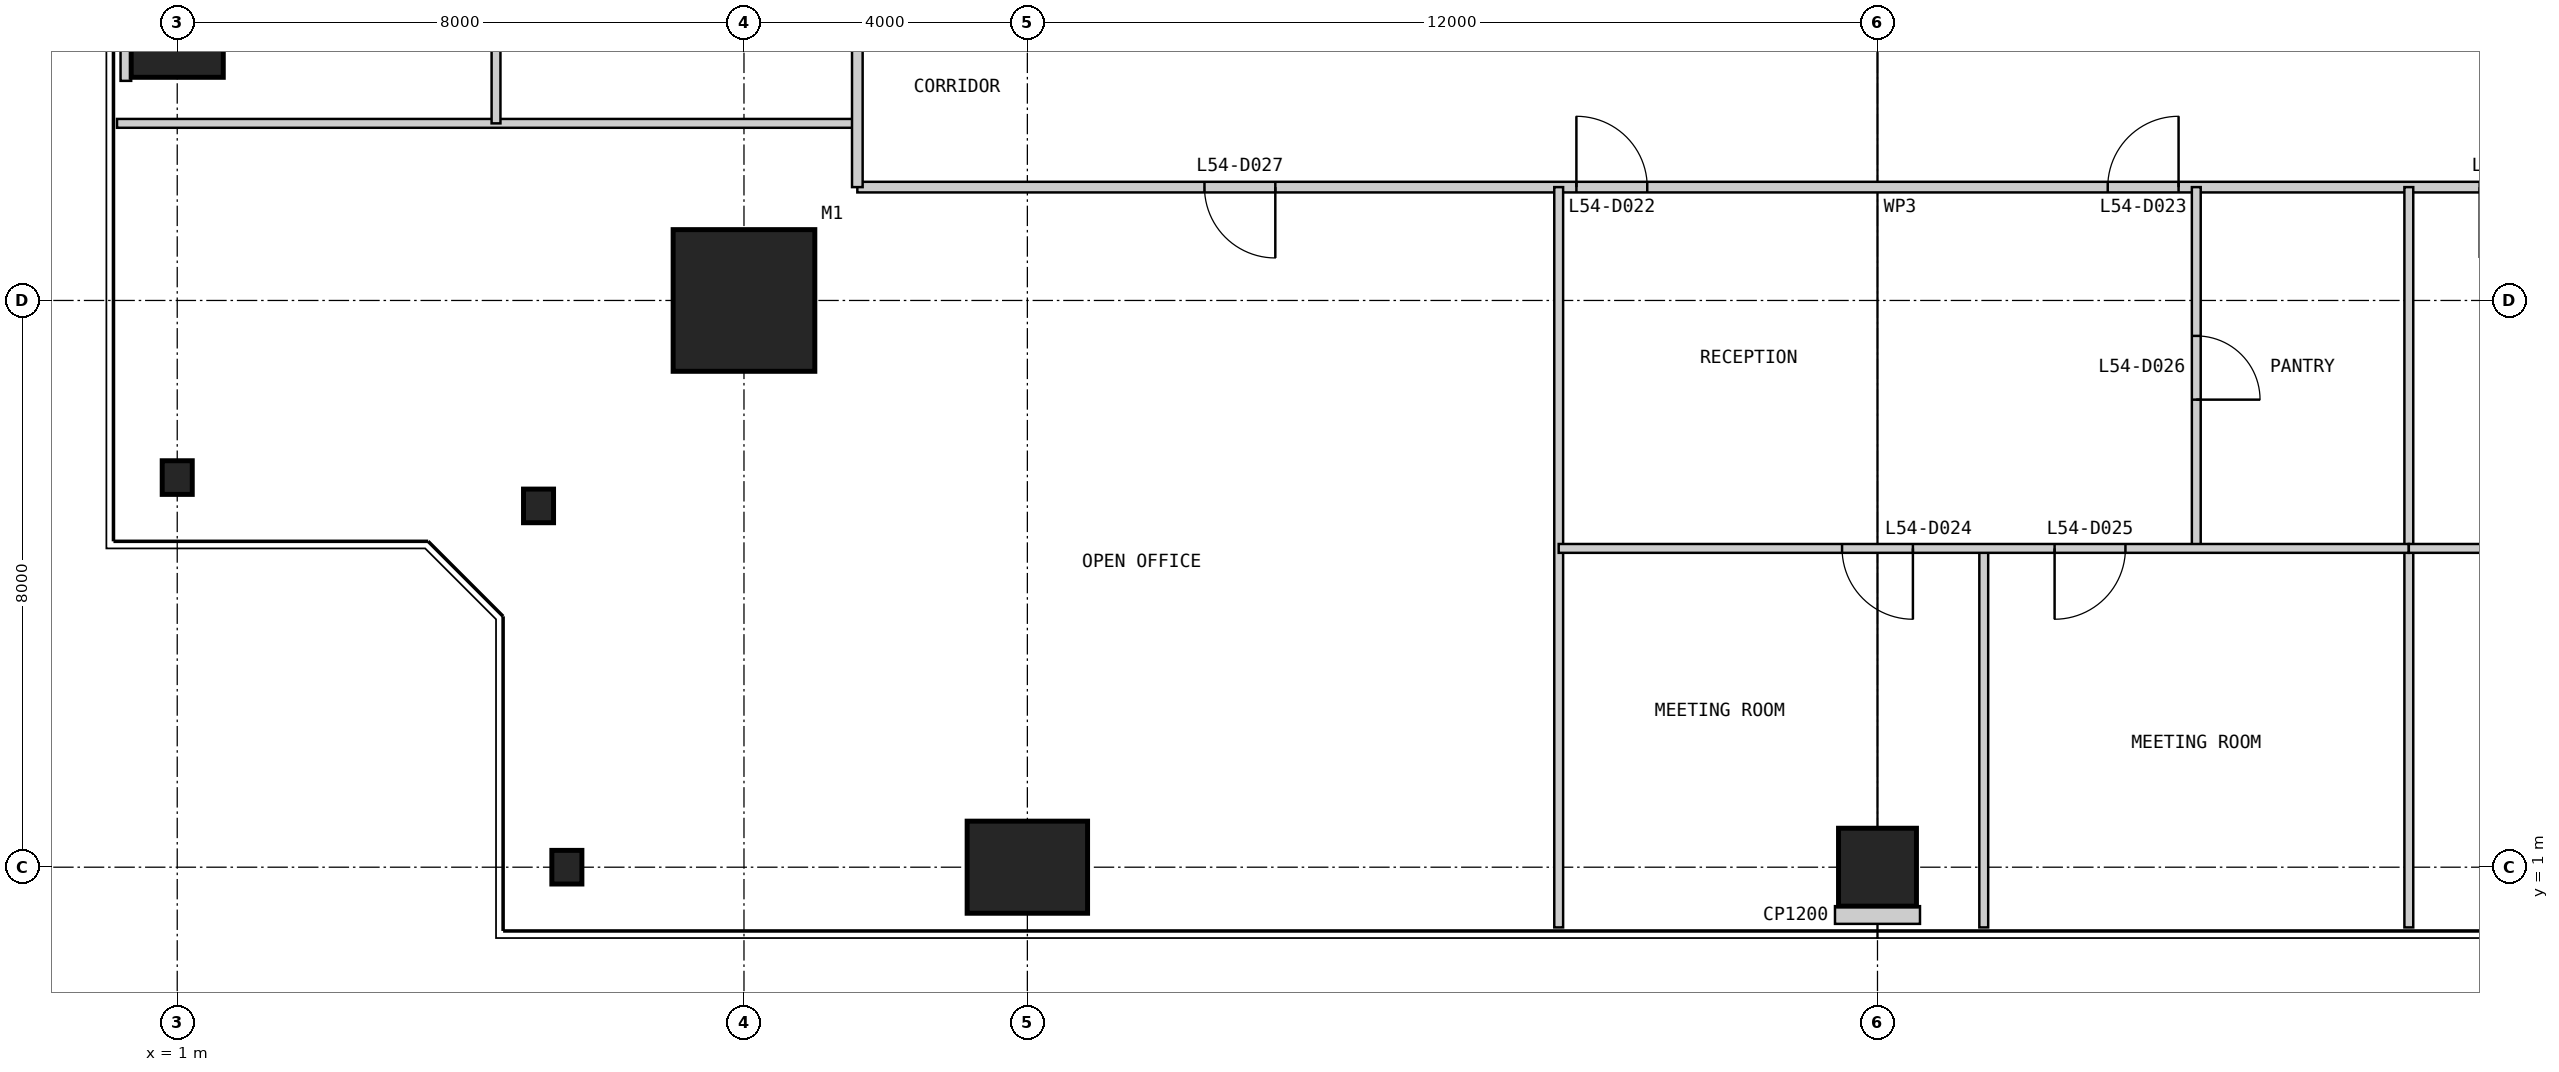
"""IFC4 building model, lengths in metres.
Left out: names, types, materials, properties, quantities, classifications, styles, units other than length and angle.
Written with IfcOpenShell. Run it as: python <this file> out.ifc"""

import sys

from ifc_helpers import new_model, si_unit, direction, frame, frame_2d, origin, origin_2d, place, context, subcontext, project, spatial, rectangle, i_section, extrude, element, fill, save


model = new_model("IFC4")
c1 = context("Model", 3, precision=1e-05, world=origin(), true_north=direction((0.0, 1.0)))
c2 = subcontext(c1, "Body", "Model", "MODEL_VIEW")
j1 = project(units=[si_unit("LENGTHUNIT", "METRE"), si_unit("PLANEANGLEUNIT", "RADIAN")], contexts=[c1])
p1 = place(None, origin())
s1 = spatial("IfcSite", under=j1, at=p1, CompositionType="ELEMENT")
p2 = place(p1, origin())
s2 = spatial("IfcBuilding", under=s1, at=p2, CompositionType="ELEMENT")
p3 = place(p2, frame((0.0, 0.0, 229.8)))
s3 = spatial("IfcBuildingStorey", under=s2, at=p3, CompositionType="ELEMENT", Elevation=229.8)
p4 = place(p3, frame((9.0, 9.0, 0.0), z_axis=(0.0, 0.0, 1.0), x_axis=(1.0, 0.0, 0.0)))
e1 = element("IfcColumn", 1, at=p4, inside=s3, PredefinedType="COLUMN", context=c2, shape_type="SweptSolid", body=[
    extrude(rectangle(XDim=2.0, YDim=2.0, at=origin_2d()), origin(), (0.0, 0.0, 1.0), 4.0),
])
p5 = place(p3, frame((6.5, 1.0, 0.0), z_axis=(0.0, 0.0, 1.0), x_axis=(1.0, 0.0, 0.0)))
e2 = element("IfcColumn", 2, at=p5, inside=s3, PredefinedType="COLUMN", context=c2, shape_type="SweptSolid", body=[
    extrude(i_section(OverallWidth=0.424, OverallDepth=0.475, WebThickness=0.048, FlangeThickness=0.077, at=origin_2d()), origin(), (0.0, 0.0, 1.0), 4.0),
])
p6 = place(p3, frame((13.0, 1.0, 0.0), z_axis=(0.0, 0.0, 1.0), x_axis=(1.0, 0.0, 0.0)))
e3 = element("IfcColumn", 3, at=p6, inside=s3, PredefinedType="COLUMN", context=c2, shape_type="SweptSolid", body=[
    extrude(rectangle(XDim=1.7, YDim=1.3, at=origin_2d()), origin(), (0.0, 0.0, 1.0), 4.0),
])
p7 = place(p3, frame((25.0, 1.0, 0.0), z_axis=(0.0, 0.0, 1.0), x_axis=(1.0, 0.0, 0.0)))
e4 = element("IfcColumn", 4, at=p7, inside=s3, PredefinedType="COLUMN", context=c2, shape_type="SweptSolid", body=[
    extrude(rectangle(XDim=1.1, YDim=1.1, at=origin_2d()), origin(), (0.0, 0.0, 1.0), 4.0),
])
p8 = place(p3, frame((1.0, 13.0, 0.0), z_axis=(0.0, 0.0, 1.0), x_axis=(1.0, 0.0, 0.0)))
e5 = element("IfcColumn", 5, at=p8, inside=s3, PredefinedType="COLUMN", context=c2, shape_type="SweptSolid", body=[
    extrude(rectangle(XDim=1.3, YDim=1.7, at=origin_2d()), origin(), (0.0, 0.0, 1.0), 4.0),
])
for number, where, z_axis, x_axis in (
    (6, (1.0, 6.5, 0.0), (0.0, 0.0, 1.0), (1.0, 0.0, 0.0)),
    (7, (6.1, 6.1, 0.0), (0.0, 0.0, 1.0), (1.0, 0.0, 0.0)),
):
    element("IfcColumn", number, at=place(p3, frame(where, z_axis=z_axis, x_axis=x_axis)), inside=s3, PredefinedType="COLUMN", context=c2, shape_type="SweptSolid", body=[
        extrude(i_section(OverallWidth=0.424, OverallDepth=0.475, WebThickness=0.048, FlangeThickness=0.077, at=origin_2d()), origin(), (0.0, 0.0, 1.0), 4.0),
    ])
p9 = place(p3, frame((10.6, 10.6, 0.0), z_axis=(0.0, 0.0, 1.0), x_axis=(1.0, 0.0, 0.0)))
e8 = element("IfcWall", 8, at=p9, inside=s3, PredefinedType="PARTITIONING", context=c2, shape_type="SweptSolid", body=[
    extrude(rectangle(XDim=28.8, YDim=0.15, at=frame_2d((14.4, 0.0))), origin(), (0.0, 0.0, 1.0), 3.8),
])
p10 = place(p9, frame((10.15, 0.0, 0.0)))
e9 = element("IfcOpeningElement", 9, at=p10, cuts=e8, PredefinedType="OPENING", context=c2, shape_type="SweptSolid", body=[
    extrude(rectangle(XDim=1.0, YDim=2.2, at=frame_2d((0.5, 1.1))), frame((0.0, 0.085, 0.0), z_axis=(0.0, -1.0, 0.0), x_axis=(1.0, 0.0, 0.0)), (0.0, 0.0, 1.0), 0.17),
])
p11 = place(p9, frame((17.65, 0.0, 0.0)))
e10 = element("IfcOpeningElement", 10, at=p11, cuts=e8, PredefinedType="OPENING", context=c2, shape_type="SweptSolid", body=[
    extrude(rectangle(XDim=1.0, YDim=2.2, at=frame_2d((0.5, 1.1))), frame((0.0, 0.085, 0.0), z_axis=(0.0, -1.0, 0.0), x_axis=(1.0, 0.0, 0.0)), (0.0, 0.0, 1.0), 0.17),
])
p12 = place(p9, frame((4.9, 0.0, 0.0)))
e11 = element("IfcOpeningElement", 11, at=p12, cuts=e8, PredefinedType="OPENING", context=c2, shape_type="SweptSolid", body=[
    extrude(rectangle(XDim=1.0, YDim=2.2, at=frame_2d((0.5, 1.1))), frame((0.0, 0.085, 0.0), z_axis=(0.0, -1.0, 0.0), x_axis=(1.0, 0.0, 0.0)), (0.0, 0.0, 1.0), 0.17),
])
p13 = place(p9, frame((22.9, 0.0, 0.0)))
e12 = element("IfcOpeningElement", 12, at=p13, cuts=e8, PredefinedType="OPENING", context=c2, shape_type="SweptSolid", body=[
    extrude(rectangle(XDim=1.0, YDim=2.2, at=frame_2d((0.5, 1.1))), frame((0.0, 0.085, 0.0), z_axis=(0.0, -1.0, 0.0), x_axis=(1.0, 0.0, 0.0)), (0.0, 0.0, 1.0), 0.17),
])
p14 = place(p9, frame((25.9, 0.0, 0.0)))
e13 = element("IfcOpeningElement", 13, at=p14, cuts=e8, PredefinedType="OPENING", context=c2, shape_type="SweptSolid", body=[
    extrude(rectangle(XDim=1.0, YDim=2.2, at=frame_2d((0.5, 1.1))), frame((0.0, 0.085, 0.0), z_axis=(0.0, -1.0, 0.0), x_axis=(1.0, 0.0, 0.0)), (0.0, 0.0, 1.0), 0.17),
])
for number, where, z_axis, x_axis in (
    (14, (0.15, 11.5, 0.0), (0.0, 0.0, 1.0), (1.0, 0.0, 0.0)),
    (15, (20.5, 0.15, 0.0), (0.0, 0.0, 1.0), (0.0, 1.0, 0.0)),
):
    element("IfcWall", number, at=place(p3, frame(where, z_axis=z_axis, x_axis=x_axis)), inside=s3, PredefinedType="PARTITIONING", context=c2, shape_type="SweptSolid", body=[
        extrude(rectangle(XDim=10.45, YDim=0.125, at=frame_2d((5.225, 0.0))), origin(), (0.0, 0.0, 1.0), 3.8),
    ])
p15 = place(p3, frame((26.5, 0.15, 0.0), z_axis=(0.0, 0.0, 1.0), x_axis=(0.0, 1.0, 0.0)))
e16 = element("IfcWall", 16, at=p15, inside=s3, PredefinedType="PARTITIONING", context=c2, shape_type="SweptSolid", body=[
    extrude(rectangle(XDim=5.35, YDim=0.125, at=frame_2d((2.675, 0.0))), origin(), (0.0, 0.0, 1.0), 3.8),
])
p16 = place(p3, frame((29.5, 5.5, 0.0), z_axis=(0.0, 0.0, 1.0), x_axis=(0.0, 1.0, 0.0)))
e17 = element("IfcWall", 17, at=p16, inside=s3, PredefinedType="PARTITIONING", context=c2, shape_type="SweptSolid", body=[
    extrude(rectangle(XDim=5.1, YDim=0.125, at=frame_2d((2.55, 0.0))), origin(), (0.0, 0.0, 1.0), 3.8),
])
p17 = place(p16, frame((2.1, 0.0, 0.0)))
e18 = element("IfcOpeningElement", 18, at=p17, cuts=e17, PredefinedType="OPENING", context=c2, shape_type="SweptSolid", body=[
    extrude(rectangle(XDim=0.9, YDim=2.2, at=frame_2d((0.45, 1.1))), frame((0.0, 0.073, 0.0), z_axis=(0.0, -1.0, 0.0), x_axis=(1.0, 0.0, 0.0)), (0.0, 0.0, 1.0), 0.145),
])
p18 = place(p3, frame((32.5, 0.15, 0.0), z_axis=(0.0, 0.0, 1.0), x_axis=(0.0, 1.0, 0.0)))
e19 = element("IfcWall", 19, at=p18, inside=s3, PredefinedType="PARTITIONING", context=c2, shape_type="SweptSolid", body=[
    extrude(rectangle(XDim=10.45, YDim=0.125, at=frame_2d((5.225, 0.0))), origin(), (0.0, 0.0, 1.0), 3.8),
])
p19 = place(p3, frame((20.5, 5.5, 0.0), z_axis=(0.0, 0.0, 1.0), x_axis=(1.0, 0.0, 0.0)))
e20 = element("IfcWall", 20, at=p19, inside=s3, PredefinedType="PARTITIONING", context=c2, shape_type="SweptSolid", body=[
    extrude(rectangle(XDim=12.0, YDim=0.125, at=frame_2d((6.0, 0.0))), origin(), (0.0, 0.0, 1.0), 3.8),
])
p20 = place(p19, frame((4.0, 0.0, 0.0)))
e21 = element("IfcOpeningElement", 21, at=p20, cuts=e20, PredefinedType="OPENING", context=c2, shape_type="SweptSolid", body=[
    extrude(rectangle(XDim=1.0, YDim=2.2, at=frame_2d((0.5, 1.1))), frame((0.0, 0.073, 0.0), z_axis=(0.0, -1.0, 0.0), x_axis=(1.0, 0.0, 0.0)), (0.0, 0.0, 1.0), 0.145),
])
p21 = place(p19, frame((7.0, 0.0, 0.0)))
e22 = element("IfcOpeningElement", 22, at=p21, cuts=e20, PredefinedType="OPENING", context=c2, shape_type="SweptSolid", body=[
    extrude(rectangle(XDim=1.0, YDim=2.2, at=frame_2d((0.5, 1.1))), frame((0.0, 0.073, 0.0), z_axis=(0.0, -1.0, 0.0), x_axis=(1.0, 0.0, 0.0)), (0.0, 0.0, 1.0), 0.145),
])
p22 = place(p3, frame((32.5, 5.5, 0.0), z_axis=(0.0, 0.0, 1.0), x_axis=(1.0, 0.0, 0.0)))
e23 = element("IfcWall", 23, at=p22, inside=s3, PredefinedType="PARTITIONING", context=c2, shape_type="SweptSolid", body=[
    extrude(rectangle(XDim=3.0, YDim=0.125, at=frame_2d((1.5, 0.0))), origin(), (0.0, 0.0, 1.0), 3.8),
])
p23 = place(p3, frame((10.6, 39.4, 0.0), z_axis=(0.0, 0.0, 1.0), x_axis=(0.0, -1.0, 0.0)))
e24 = element("IfcWall", 24, at=p23, inside=s3, PredefinedType="PARTITIONING", context=c2, shape_type="SweptSolid", body=[
    extrude(rectangle(XDim=28.8, YDim=0.15, at=frame_2d((14.4, 0.0))), origin(), (0.0, 0.0, 1.0), 3.8),
])
p24 = place(p23, frame((1.15, 0.0, 0.0)))
e25 = element("IfcOpeningElement", 25, at=p24, cuts=e24, PredefinedType="OPENING", context=c2, shape_type="SweptSolid", body=[
    extrude(rectangle(XDim=1.0, YDim=2.2, at=frame_2d((0.5, 1.1))), frame((0.0, 0.085, 0.0), z_axis=(0.0, -1.0, 0.0), x_axis=(1.0, 0.0, 0.0)), (0.0, 0.0, 1.0), 0.17),
])
p25 = place(p23, frame((23.65, 0.0, 0.0)))
e26 = element("IfcOpeningElement", 26, at=p25, cuts=e24, PredefinedType="OPENING", context=c2, shape_type="SweptSolid", body=[
    extrude(rectangle(XDim=1.0, YDim=2.2, at=frame_2d((0.5, 1.1))), frame((0.0, 0.085, 0.0), z_axis=(0.0, -1.0, 0.0), x_axis=(1.0, 0.0, 0.0)), (0.0, 0.0, 1.0), 0.17),
])
p26 = place(p3, frame((5.5, 35.5, 0.0), z_axis=(0.0, 0.0, 1.0), x_axis=(0.0, -1.0, 0.0)))
e27 = element("IfcWall", 27, at=p26, inside=s3, PredefinedType="PARTITIONING", context=c2, shape_type="SweptSolid", body=[
    extrude(rectangle(XDim=24.0, YDim=0.125, at=frame_2d((12.0, 0.0))), origin(), (0.0, 0.0, 1.0), 3.8),
])
p27 = place(p26, frame((16.05, 0.0, 0.0)))
e28 = element("IfcOpeningElement", 28, at=p27, cuts=e27, PredefinedType="OPENING", context=c2, shape_type="SweptSolid", body=[
    extrude(rectangle(XDim=0.9, YDim=2.2, at=frame_2d((0.45, 1.1))), frame((0.0, 0.073, 0.0), z_axis=(0.0, -1.0, 0.0), x_axis=(1.0, 0.0, 0.0)), (0.0, 0.0, 1.0), 0.145),
])
p28 = place(p26, frame((19.05, 0.0, 0.0)))
e29 = element("IfcOpeningElement", 29, at=p28, cuts=e27, PredefinedType="OPENING", context=c2, shape_type="SweptSolid", body=[
    extrude(rectangle(XDim=0.9, YDim=2.2, at=frame_2d((0.45, 1.1))), frame((0.0, 0.073, 0.0), z_axis=(0.0, -1.0, 0.0), x_axis=(1.0, 0.0, 0.0)), (0.0, 0.0, 1.0), 0.145),
])
p29 = place(p3, frame((25.0, 0.2, 0.0), z_axis=(0.0, 0.0, 1.0), x_axis=(0.0, 1.0, 0.0)))
e30 = element("IfcWall", 30, at=p29, inside=s3, PredefinedType="PARTITIONING", context=c2, shape_type="SweptSolid", body=[
    extrude(rectangle(XDim=0.25, YDim=1.2, at=frame_2d((0.125, 0.0))), origin(), (0.0, 0.0, 1.0), 3.8),
])
p30 = place(p3, frame((0.2, 13.0, 0.0), z_axis=(0.0, 0.0, 1.0), x_axis=(1.0, 0.0, 0.0)))
e31 = element("IfcWall", 31, at=p30, inside=s3, PredefinedType="PARTITIONING", context=c2, shape_type="SweptSolid", body=[
    extrude(rectangle(XDim=0.15, YDim=1.8, at=frame_2d((0.075, 0.0))), origin(), (0.0, 0.0, 1.0), 3.8),
])
p31 = place(p10, origin())
e32 = element("IfcDoor", 32, at=p31, inside=s3, OperationType="SINGLE_SWING_LEFT", PredefinedType="DOOR", context=c2, shape_type="SweptSolid", body=[
    extrude(rectangle(XDim=1.0, YDim=2.2, at=frame_2d((0.5, 1.1))), frame((0.0, 0.025, 0.0), z_axis=(0.0, -1.0, 0.0), x_axis=(1.0, 0.0, 0.0)), (0.0, 0.0, 1.0), 0.05),
])
fill(e9, e32)
p32 = place(p11, origin())
e33 = element("IfcDoor", 33, at=p32, inside=s3, OperationType="SINGLE_SWING_RIGHT", PredefinedType="DOOR", context=c2, shape_type="SweptSolid", body=[
    extrude(rectangle(XDim=1.0, YDim=2.2, at=frame_2d((0.5, 1.1))), frame((0.0, 0.025, 0.0), z_axis=(0.0, -1.0, 0.0), x_axis=(1.0, 0.0, 0.0)), (0.0, 0.0, 1.0), 0.05),
])
fill(e10, e33)
p33 = place(p20, frame((1.0, 0.0, 0.0), z_axis=(0.0, 0.0, 1.0), x_axis=(-1.0, 0.0, 0.0)))
e34 = element("IfcDoor", 34, at=p33, inside=s3, OperationType="SINGLE_SWING_LEFT", PredefinedType="DOOR", context=c2, shape_type="SweptSolid", body=[
    extrude(rectangle(XDim=1.0, YDim=2.2, at=frame_2d((0.5, 1.1))), frame((0.0, 0.025, 0.0), z_axis=(0.0, -1.0, 0.0), x_axis=(1.0, 0.0, 0.0)), (0.0, 0.0, 1.0), 0.05),
])
fill(e21, e34)
p34 = place(p21, frame((1.0, 0.0, 0.0), z_axis=(0.0, 0.0, 1.0), x_axis=(-1.0, 0.0, 0.0)))
e35 = element("IfcDoor", 35, at=p34, inside=s3, OperationType="SINGLE_SWING_RIGHT", PredefinedType="DOOR", context=c2, shape_type="SweptSolid", body=[
    extrude(rectangle(XDim=1.0, YDim=2.2, at=frame_2d((0.5, 1.1))), frame((0.0, 0.025, 0.0), z_axis=(0.0, -1.0, 0.0), x_axis=(1.0, 0.0, 0.0)), (0.0, 0.0, 1.0), 0.05),
])
fill(e22, e35)
p35 = place(p17, frame((0.9, 0.0, 0.0), z_axis=(0.0, 0.0, 1.0), x_axis=(-1.0, 0.0, 0.0)))
e36 = element("IfcDoor", 36, at=p35, inside=s3, OperationType="SINGLE_SWING_RIGHT", PredefinedType="DOOR", context=c2, shape_type="SweptSolid", body=[
    extrude(rectangle(XDim=0.9, YDim=2.2, at=frame_2d((0.45, 1.1))), frame((0.0, 0.025, 0.0), z_axis=(0.0, -1.0, 0.0), x_axis=(1.0, 0.0, 0.0)), (0.0, 0.0, 1.0), 0.05),
])
fill(e18, e36)
p36 = place(p12, frame((1.0, 0.0, 0.0), z_axis=(0.0, 0.0, 1.0), x_axis=(-1.0, 0.0, 0.0)))
e37 = element("IfcDoor", 37, at=p36, inside=s3, OperationType="SINGLE_SWING_LEFT", PredefinedType="DOOR", context=c2, shape_type="SweptSolid", body=[
    extrude(rectangle(XDim=1.0, YDim=2.2, at=frame_2d((0.5, 1.1))), frame((0.0, 0.025, 0.0), z_axis=(0.0, -1.0, 0.0), x_axis=(1.0, 0.0, 0.0)), (0.0, 0.0, 1.0), 0.05),
])
fill(e11, e37)
save(model, sys.argv[1])
